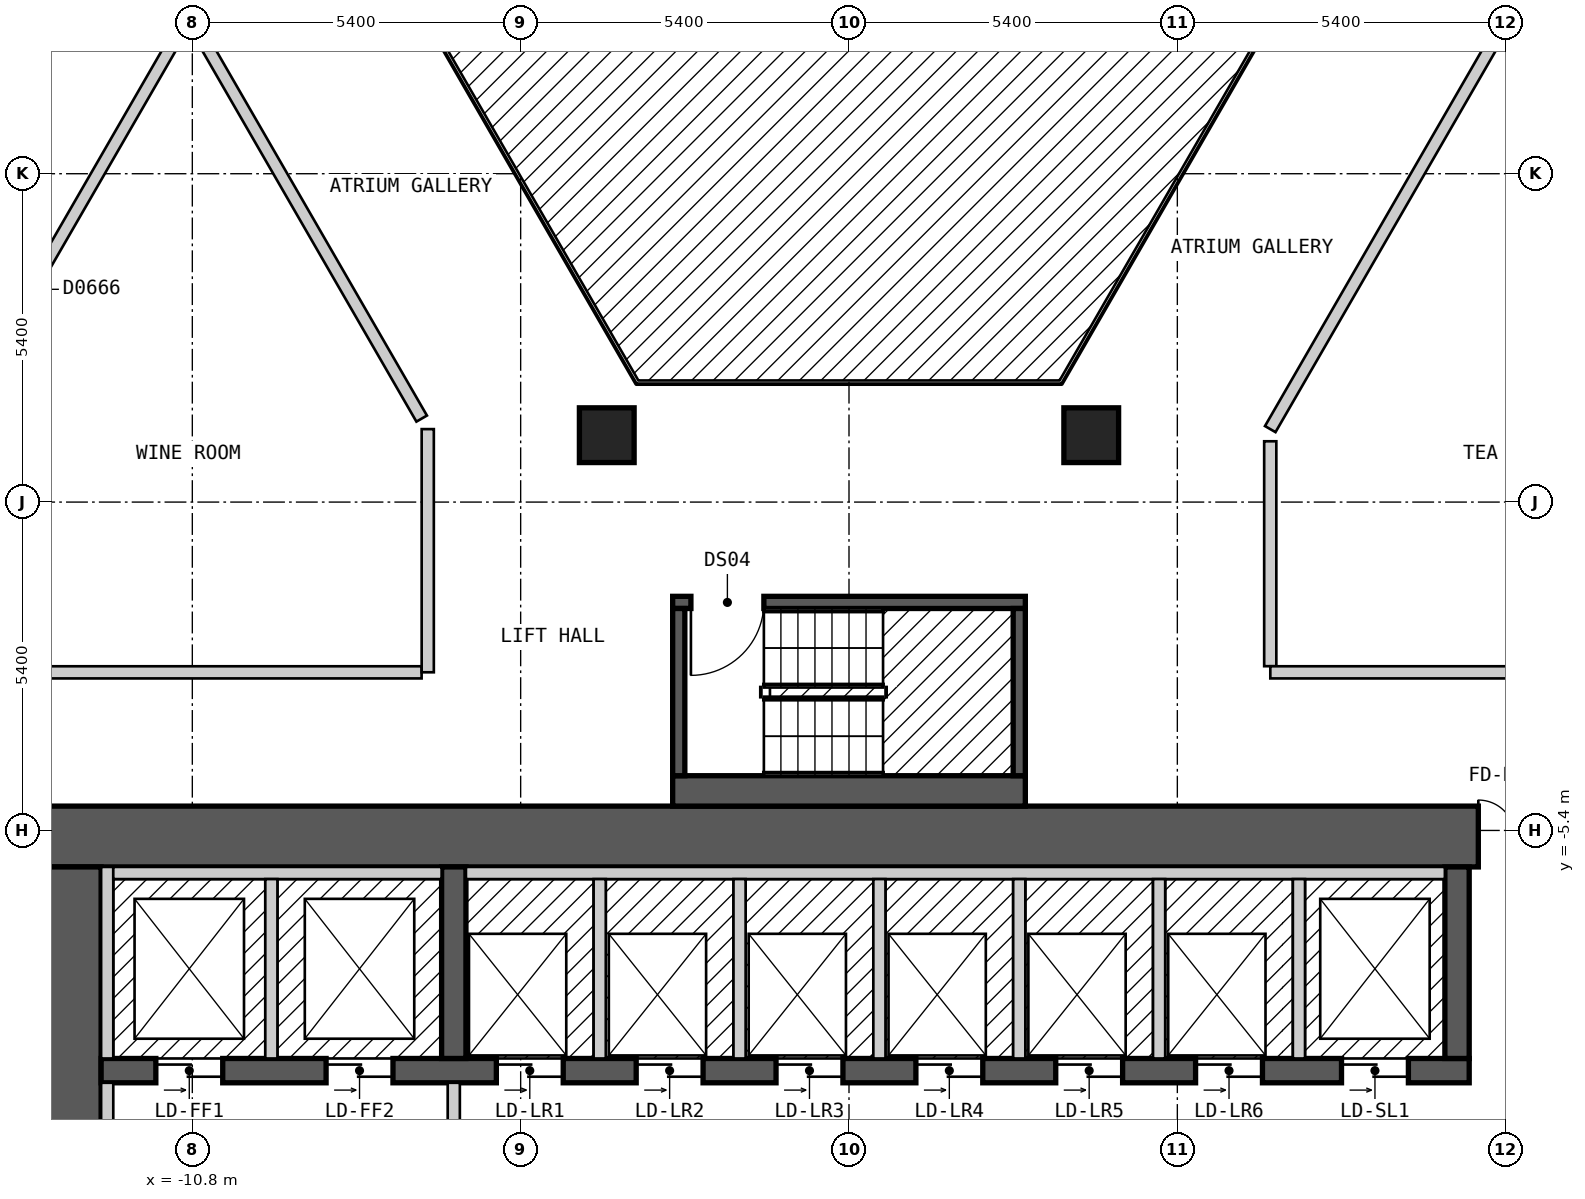
"""IFC4 building model, lengths in metres.
Left out: names, types, materials, properties, quantities, classifications, styles, units other than length and angle.
Written with IfcOpenShell. Run it as: python <this file> out.ifc"""

import sys

from ifc_helpers import new_model, si_unit, direction, frame, frame_2d, origin, origin_2d, place, context, subcontext, project, spatial, rectangle, extrude, element, fill, save


model = new_model("IFC4")
c1 = context("Model", 3, precision=1e-05, world=origin(), true_north=direction((0.0, 1.0)))
c2 = subcontext(c1, "Body", "Model", "MODEL_VIEW")
j1 = project(units=[si_unit("LENGTHUNIT", "METRE"), si_unit("PLANEANGLEUNIT", "RADIAN")], contexts=[c1])
p1 = place(None, origin())
s1 = spatial("IfcSite", under=j1, at=p1, CompositionType="ELEMENT")
p2 = place(p1, origin())
s2 = spatial("IfcBuilding", under=s1, at=p2, CompositionType="ELEMENT")
p3 = place(p2, frame((0.0, 0.0, 81.0)))
s3 = spatial("IfcBuildingStorey", under=s2, at=p3, CompositionType="ELEMENT", Elevation=81.0)
for number, where, z_axis, x_axis in (
    (1, (3.984, 1.1, 0.0), (0.0, 0.0, 1.0), (1.0, 0.0, 0.0)),
    (2, (-3.984, 1.1, 0.0), (0.0, 0.0, 1.0), (1.0, 0.0, 0.0)),
):
    element("IfcColumn", number, at=place(p3, frame(where, z_axis=z_axis, x_axis=x_axis)), inside=s3, PredefinedType="COLUMN", context=c2, shape_type="SweptSolid", body=[
        extrude(rectangle(XDim=0.9, YDim=0.9, at=origin_2d()), origin(), (0.0, 0.0, 1.0), 3.0),
    ])
p4 = place(p3, frame((-13.3, -5.5, 0.0), z_axis=(0.0, 0.0, 1.0), x_axis=(1.0, 0.0, 0.0)))
e3 = element("IfcWall", 3, at=p4, inside=s3, PredefinedType="SHEAR", context=c2, shape_type="SweptSolid", body=[
    extrude(rectangle(XDim=26.6, YDim=1.0, at=frame_2d((13.3, 0.0))), origin(), (0.0, 0.0, 1.0), 2.7),
])
p5 = place(p4, frame((23.65, 0.0, 0.0)))
e4 = element("IfcOpeningElement", 4, at=p5, cuts=e3, PredefinedType="OPENING", context=c2, shape_type="SweptSolid", body=[
    extrude(rectangle(XDim=1.2, YDim=2.1, at=frame_2d((0.6, 1.05))), frame((0.0, 0.51, 0.0), z_axis=(0.0, -1.0, 0.0), x_axis=(1.0, 0.0, 0.0)), (0.0, 0.0, 1.0), 1.02),
])
p6 = place(p3, frame((-12.8, -18.0, 0.0), z_axis=(0.0, 0.0, 1.0), x_axis=(0.0, 1.0, 0.0)))
e5 = element("IfcWall", 5, at=p6, inside=s3, PredefinedType="SHEAR", context=c2, shape_type="SweptSolid", body=[
    extrude(rectangle(XDim=12.0, YDim=1.0, at=frame_2d((6.0, 0.0))), origin(), (0.0, 0.0, 1.0), 2.7),
])
p7 = place(p6, frame((3.8, 0.0, 0.0)))
e6 = element("IfcOpeningElement", 6, at=p7, cuts=e5, PredefinedType="OPENING", context=c2, shape_type="SweptSolid", body=[
    extrude(rectangle(XDim=1.2, YDim=2.1, at=frame_2d((0.6, 1.05))), frame((0.0, 0.51, 0.0), z_axis=(0.0, -1.0, 0.0), x_axis=(1.0, 0.0, 0.0)), (0.0, 0.0, 1.0), 1.02),
])
p8 = place(p3, frame((-12.3, -9.35, 0.0), z_axis=(0.0, 0.0, 1.0), x_axis=(1.0, 0.0, 0.0)))
e7 = element("IfcWall", 7, at=p8, inside=s3, PredefinedType="SHEAR", context=c2, shape_type="SweptSolid", body=[
    extrude(rectangle(XDim=22.5, YDim=0.4, at=frame_2d((11.25, 0.0))), origin(), (0.0, 0.0, 1.0), 2.7),
])
p9 = place(p8, frame((0.9, 0.0, 0.0)))
e8 = element("IfcOpeningElement", 8, at=p9, cuts=e7, PredefinedType="OPENING", context=c2, shape_type="SweptSolid", body=[
    extrude(rectangle(XDim=1.1, YDim=2.1, at=frame_2d((0.55, 1.05))), frame((0.0, 0.21, 0.0), z_axis=(0.0, -1.0, 0.0), x_axis=(1.0, 0.0, 0.0)), (0.0, 0.0, 1.0), 0.42),
])
p10 = place(p8, frame((3.7, 0.0, 0.0)))
e9 = element("IfcOpeningElement", 9, at=p10, cuts=e7, PredefinedType="OPENING", context=c2, shape_type="SweptSolid", body=[
    extrude(rectangle(XDim=1.1, YDim=2.1, at=frame_2d((0.55, 1.05))), frame((0.0, 0.21, 0.0), z_axis=(0.0, -1.0, 0.0), x_axis=(1.0, 0.0, 0.0)), (0.0, 0.0, 1.0), 0.42),
])
p11 = place(p8, frame((6.5, 0.0, 0.0)))
e10 = element("IfcOpeningElement", 10, at=p11, cuts=e7, PredefinedType="OPENING", context=c2, shape_type="SweptSolid", body=[
    extrude(rectangle(XDim=1.1, YDim=2.1, at=frame_2d((0.55, 1.05))), frame((0.0, 0.21, 0.0), z_axis=(0.0, -1.0, 0.0), x_axis=(1.0, 0.0, 0.0)), (0.0, 0.0, 1.0), 0.42),
])
p12 = place(p8, frame((8.8, 0.0, 0.0)))
e11 = element("IfcOpeningElement", 11, at=p12, cuts=e7, PredefinedType="OPENING", context=c2, shape_type="SweptSolid", body=[
    extrude(rectangle(XDim=1.1, YDim=2.1, at=frame_2d((0.55, 1.05))), frame((0.0, 0.21, 0.0), z_axis=(0.0, -1.0, 0.0), x_axis=(1.0, 0.0, 0.0)), (0.0, 0.0, 1.0), 0.42),
])
p13 = place(p8, frame((11.1, 0.0, 0.0)))
e12 = element("IfcOpeningElement", 12, at=p13, cuts=e7, PredefinedType="OPENING", context=c2, shape_type="SweptSolid", body=[
    extrude(rectangle(XDim=1.1, YDim=2.1, at=frame_2d((0.55, 1.05))), frame((0.0, 0.21, 0.0), z_axis=(0.0, -1.0, 0.0), x_axis=(1.0, 0.0, 0.0)), (0.0, 0.0, 1.0), 0.42),
])
p14 = place(p8, frame((13.4, 0.0, 0.0)))
e13 = element("IfcOpeningElement", 13, at=p14, cuts=e7, PredefinedType="OPENING", context=c2, shape_type="SweptSolid", body=[
    extrude(rectangle(XDim=1.1, YDim=2.1, at=frame_2d((0.55, 1.05))), frame((0.0, 0.21, 0.0), z_axis=(0.0, -1.0, 0.0), x_axis=(1.0, 0.0, 0.0)), (0.0, 0.0, 1.0), 0.42),
])
p15 = place(p8, frame((15.7, 0.0, 0.0)))
e14 = element("IfcOpeningElement", 14, at=p15, cuts=e7, PredefinedType="OPENING", context=c2, shape_type="SweptSolid", body=[
    extrude(rectangle(XDim=1.1, YDim=2.1, at=frame_2d((0.55, 1.05))), frame((0.0, 0.21, 0.0), z_axis=(0.0, -1.0, 0.0), x_axis=(1.0, 0.0, 0.0)), (0.0, 0.0, 1.0), 0.42),
])
p16 = place(p8, frame((18.0, 0.0, 0.0)))
e15 = element("IfcOpeningElement", 15, at=p16, cuts=e7, PredefinedType="OPENING", context=c2, shape_type="SweptSolid", body=[
    extrude(rectangle(XDim=1.1, YDim=2.1, at=frame_2d((0.55, 1.05))), frame((0.0, 0.21, 0.0), z_axis=(0.0, -1.0, 0.0), x_axis=(1.0, 0.0, 0.0)), (0.0, 0.0, 1.0), 0.42),
])
p17 = place(p8, frame((20.4, 0.0, 0.0)))
e16 = element("IfcOpeningElement", 16, at=p17, cuts=e7, PredefinedType="OPENING", context=c2, shape_type="SweptSolid", body=[
    extrude(rectangle(XDim=1.1, YDim=2.1, at=frame_2d((0.55, 1.05))), frame((0.0, 0.21, 0.0), z_axis=(0.0, -1.0, 0.0), x_axis=(1.0, 0.0, 0.0)), (0.0, 0.0, 1.0), 0.42),
])
for number, where, z_axis, x_axis in (
    (17, (-6.5, -9.15, 0.0), (0.0, 0.0, 1.0), (0.0, 1.0, 0.0)),
    (18, (10.0, -9.15, 0.0), (0.0, 0.0, 1.0), (0.0, 1.0, 0.0)),
):
    element("IfcWall", number, at=place(p3, frame(where, z_axis=z_axis, x_axis=x_axis)), inside=s3, PredefinedType="SHEAR", context=c2, shape_type="SweptSolid", body=[
        extrude(rectangle(XDim=3.15, YDim=0.4, at=frame_2d((1.575, 0.0))), origin(), (0.0, 0.0, 1.0), 2.7),
    ])
p18 = place(p3, frame((-2.9, -4.75, 0.0), z_axis=(0.0, 0.0, 1.0), x_axis=(1.0, 0.0, 0.0)))
e19 = element("IfcWall", 19, at=p18, inside=s3, PredefinedType="SOLIDWALL", context=c2, shape_type="SweptSolid", body=[
    extrude(rectangle(XDim=5.8, YDim=0.5, at=frame_2d((2.9, 0.0))), origin(), (0.0, 0.0, 1.0), 2.7),
])
p19 = place(p3, frame((-2.9, -1.65, 0.0), z_axis=(0.0, 0.0, 1.0), x_axis=(1.0, 0.0, 0.0)))
e20 = element("IfcWall", 20, at=p19, inside=s3, PredefinedType="SOLIDWALL", context=c2, shape_type="SweptSolid", body=[
    extrude(rectangle(XDim=5.8, YDim=0.2, at=frame_2d((2.9, 0.0))), origin(), (0.0, 0.0, 1.0), 2.7),
])
p20 = place(p19, frame((0.3, 0.0, 0.0)))
e21 = element("IfcOpeningElement", 21, at=p20, cuts=e20, PredefinedType="OPENING", context=c2, shape_type="SweptSolid", body=[
    extrude(rectangle(XDim=1.2, YDim=2.1, at=frame_2d((0.6, 1.05))), frame((0.0, 0.11, 0.0), z_axis=(0.0, -1.0, 0.0), x_axis=(1.0, 0.0, 0.0)), (0.0, 0.0, 1.0), 0.22),
])
for number, where, z_axis, x_axis in (
    (22, (-2.8, -4.5, 0.0), (0.0, 0.0, 1.0), (0.0, 1.0, 0.0)),
    (23, (2.8, -4.5, 0.0), (0.0, 0.0, 1.0), (0.0, 1.0, 0.0)),
):
    element("IfcWall", number, at=place(p3, frame(where, z_axis=z_axis, x_axis=x_axis)), inside=s3, PredefinedType="SOLIDWALL", context=c2, shape_type="SweptSolid", body=[
        extrude(rectangle(XDim=2.75, YDim=0.2, at=frame_2d((1.375, 0.0))), origin(), (0.0, 0.0, 1.0), 2.7),
    ])
p21 = place(p3, frame((-10.796, 7.899, 0.0), z_axis=(0.0, 0.0, 1.0), x_axis=(0.500010383074, -0.866019409031, 0.0)))
e24 = element("IfcWall", 24, at=p21, inside=s3, PredefinedType="PARTITIONING", context=c2, shape_type="SweptSolid", body=[
    extrude(rectangle(XDim=7.535, YDim=0.2, at=frame_2d((3.768, 0.0))), origin(), (0.0, 0.0, 1.0), 2.7),
])
p22 = place(p3, frame((8.488, 16.5, 0.0), z_axis=(0.0, 0.0, 1.0), x_axis=(0.499986836607, -0.86603300354, 0.0)))
e25 = element("IfcWall", 25, at=p22, inside=s3, PredefinedType="PARTITIONING", context=c2, shape_type="SweptSolid", body=[
    extrude(rectangle(XDim=20.09, YDim=0.2, at=frame_2d((10.045, 0.0))), origin(), (0.0, 0.0, 1.0), 2.7),
])
p23 = place(p22, frame((14.569, 0.0, 0.0)))
e26 = element("IfcOpeningElement", 26, at=p23, cuts=e25, PredefinedType="OPENING", context=c2, shape_type="SweptSolid", body=[
    extrude(rectangle(XDim=1.0, YDim=2.1, at=frame_2d((0.5, 1.05))), frame((0.0, 0.11, 0.0), z_axis=(0.0, -1.0, 0.0), x_axis=(1.0, 0.0, 0.0)), (0.0, 0.0, 1.0), 0.22),
])
p24 = place(p3, frame((6.928, 1.0, 0.0), z_axis=(0.0, 0.0, 1.0), x_axis=(0.0, -1.0, 0.0)))
e27 = element("IfcWall", 27, at=p24, inside=s3, PredefinedType="PARTITIONING", context=c2, shape_type="SweptSolid", body=[
    extrude(rectangle(XDim=3.699, YDim=0.2, at=frame_2d((1.85, 0.0))), origin(), (0.0, 0.0, 1.0), 2.7),
])
p25 = place(p3, frame((-15.011, -2.8, 0.0), z_axis=(0.0, 0.0, 1.0), x_axis=(1.0, 0.0, 0.0)))
e28 = element("IfcWall", 28, at=p25, inside=s3, PredefinedType="PARTITIONING", context=c2, shape_type="SweptSolid", body=[
    extrude(rectangle(XDim=7.982, YDim=0.2, at=frame_2d((3.991, 0.0))), origin(), (0.0, 0.0, 1.0), 2.7),
])
p26 = place(p3, frame((6.929, -2.8, 0.0), z_axis=(0.0, 0.0, 1.0), x_axis=(1.0, 0.0, 0.0)))
e29 = element("IfcWall", 29, at=p26, inside=s3, PredefinedType="PARTITIONING", context=c2, shape_type="SweptSolid", body=[
    extrude(rectangle(XDim=7.966, YDim=0.2, at=frame_2d((3.983, 0.0))), origin(), (0.0, 0.0, 1.0), 2.7),
])
p27 = place(p3, frame((6.928, 1.2, 0.0), z_axis=(0.0, 0.0, 1.0), x_axis=(0.500055327065, 0.865993458332, 0.0)))
e30 = element("IfcWall", 30, at=p27, inside=s3, PredefinedType="PARTITIONING", context=c2, shape_type="SweptSolid", body=[
    extrude(rectangle(XDim=7.851, YDim=0.2, at=frame_2d((3.926, 0.0))), origin(), (0.0, 0.0, 1.0), 2.7),
])
p28 = place(p3, frame((-16.05, -1.0, 0.0), z_axis=(0.0, 0.0, 1.0), x_axis=(0.499962449088, 0.866047082728, 0.0)))
e31 = element("IfcWall", 31, at=p28, inside=s3, PredefinedType="PARTITIONING", context=c2, shape_type="SweptSolid", body=[
    extrude(rectangle(XDim=10.391, YDim=0.2, at=frame_2d((5.195, 0.0))), origin(), (0.0, 0.0, 1.0), 2.7),
])
p29 = place(p28, frame((4.745, 0.0, 0.0)))
e32 = element("IfcOpeningElement", 32, at=p29, cuts=e31, PredefinedType="OPENING", context=c2, shape_type="SweptSolid", body=[
    extrude(rectangle(XDim=0.9, YDim=2.1, at=frame_2d((0.45, 1.05))), frame((0.0, 0.11, 0.0), z_axis=(0.0, -1.0, 0.0), x_axis=(1.0, 0.0, 0.0)), (0.0, 0.0, 1.0), 0.22),
])
p30 = place(p3, frame((-18.562, -0.951, 0.0), z_axis=(0.0, 0.0, 1.0), x_axis=(0.499992962407, 0.866029466902, 0.0)))
e33 = element("IfcWall", 33, at=p30, inside=s3, PredefinedType="PARTITIONING", context=c2, shape_type="SweptSolid", body=[
    extrude(rectangle(XDim=20.208, YDim=0.2, at=frame_2d((10.104, 0.0))), origin(), (0.0, 0.0, 1.0), 2.7),
])
p31 = place(p30, frame((9.604, 0.0, 0.0)))
e34 = element("IfcOpeningElement", 34, at=p31, cuts=e33, PredefinedType="OPENING", context=c2, shape_type="SweptSolid", body=[
    extrude(rectangle(XDim=1.0, YDim=2.1, at=frame_2d((0.5, 1.05))), frame((0.0, 0.11, 0.0), z_axis=(0.0, -1.0, 0.0), x_axis=(1.0, 0.0, 0.0)), (0.0, 0.0, 1.0), 0.22),
])
p32 = place(p3, frame((-6.928, -2.799, 0.0), z_axis=(0.0, 0.0, 1.0), x_axis=(0.0, 1.0, 0.0)))
e35 = element("IfcWall", 35, at=p32, inside=s3, PredefinedType="PARTITIONING", context=c2, shape_type="SweptSolid", body=[
    extrude(rectangle(XDim=3.999, YDim=0.2, at=frame_2d((2.0, 0.0))), origin(), (0.0, 0.0, 1.0), 2.7),
])
p33 = place(p3, frame((-12.2, -13.0, 0.0), z_axis=(0.0, 0.0, 1.0), x_axis=(0.0, 1.0, 0.0)))
e36 = element("IfcWall", 36, at=p33, inside=s3, PredefinedType="PARTITIONING", context=c2, shape_type="SweptSolid", body=[
    extrude(rectangle(XDim=3.45, YDim=0.2, at=frame_2d((1.725, 0.0))), origin(), (0.0, 0.0, 1.0), 2.7),
])
p34 = place(p3, frame((-12.2, -9.15, 0.0), z_axis=(0.0, 0.0, 1.0), x_axis=(0.0, 1.0, 0.0)))
e37 = element("IfcWall", 37, at=p34, inside=s3, PredefinedType="SOLIDWALL", context=c2, shape_type="SweptSolid", body=[
    extrude(rectangle(XDim=3.15, YDim=0.2, at=frame_2d((1.575, 0.0))), origin(), (0.0, 0.0, 1.0), 2.7),
])
p35 = place(p3, frame((-12.1, -6.1, 0.0), z_axis=(0.0, 0.0, 1.0), x_axis=(1.0, 0.0, 0.0)))
e38 = element("IfcWall", 38, at=p35, inside=s3, PredefinedType="SOLIDWALL", context=c2, shape_type="SweptSolid", body=[
    extrude(rectangle(XDim=5.4, YDim=0.2, at=frame_2d((2.7, 0.0))), origin(), (0.0, 0.0, 1.0), 2.7),
])
p36 = place(p3, frame((-9.5, -9.15, 0.0), z_axis=(0.0, 0.0, 1.0), x_axis=(0.0, 1.0, 0.0)))
e39 = element("IfcWall", 39, at=p36, inside=s3, PredefinedType="SOLIDWALL", context=c2, shape_type="SweptSolid", body=[
    extrude(rectangle(XDim=2.95, YDim=0.2, at=frame_2d((1.475, 0.0))), origin(), (0.0, 0.0, 1.0), 2.7),
])
p37 = place(p3, frame((-6.5, -14.45, 0.0), z_axis=(0.0, 0.0, 1.0), x_axis=(0.0, 1.0, 0.0)))
e40 = element("IfcWall", 40, at=p37, inside=s3, PredefinedType="PARTITIONING", context=c2, shape_type="SweptSolid", body=[
    extrude(rectangle(XDim=4.9, YDim=0.2, at=frame_2d((2.45, 0.0))), origin(), (0.0, 0.0, 1.0), 2.7),
])
p38 = place(p37, frame((3.15, 0.0, 0.0), z_axis=(0.0, 0.0, 1.0), x_axis=(-1.0, 0.0, 0.0)))
e41 = element("IfcOpeningElement", 41, at=p38, cuts=e40, PredefinedType="OPENING", context=c2, shape_type="SweptSolid", body=[
    extrude(rectangle(XDim=1.4, YDim=2.1, at=frame_2d((0.7, 1.05))), frame((0.0, 0.11, 0.0), z_axis=(0.0, -1.0, 0.0), x_axis=(1.0, 0.0, 0.0)), (0.0, 0.0, 1.0), 0.22),
])
p39 = place(p3, frame((-6.3, -6.1, 0.0), z_axis=(0.0, 0.0, 1.0), x_axis=(1.0, 0.0, 0.0)))
e42 = element("IfcWall", 42, at=p39, inside=s3, PredefinedType="SOLIDWALL", context=c2, shape_type="SweptSolid", body=[
    extrude(rectangle(XDim=16.1, YDim=0.2, at=frame_2d((8.05, 0.0))), origin(), (0.0, 0.0, 1.0), 2.7),
])
for number, where, z_axis, x_axis in (
    (43, (-4.1, -9.15, 0.0), (0.0, 0.0, 1.0), (0.0, 1.0, 0.0)),
    (44, (-1.8, -9.15, 0.0), (0.0, 0.0, 1.0), (0.0, 1.0, 0.0)),
    (45, (0.5, -9.15, 0.0), (0.0, 0.0, 1.0), (0.0, 1.0, 0.0)),
    (46, (2.8, -9.15, 0.0), (0.0, 0.0, 1.0), (0.0, 1.0, 0.0)),
    (47, (5.1, -9.15, 0.0), (0.0, 0.0, 1.0), (0.0, 1.0, 0.0)),
    (48, (7.4, -9.15, 0.0), (0.0, 0.0, 1.0), (0.0, 1.0, 0.0)),
):
    element("IfcWall", number, at=place(p3, frame(where, z_axis=z_axis, x_axis=x_axis)), inside=s3, PredefinedType="SOLIDWALL", context=c2, shape_type="SweptSolid", body=[
        extrude(rectangle(XDim=2.95, YDim=0.2, at=frame_2d((1.475, 0.0))), origin(), (0.0, 0.0, 1.0), 2.7),
    ])
p40 = place(p20, origin())
e49 = element("IfcDoor", 49, at=p40, inside=s3, OperationType="SINGLE_SWING_LEFT", PredefinedType="DOOR", context=c2, shape_type="SweptSolid", body=[
    extrude(rectangle(XDim=1.2, YDim=2.1, at=frame_2d((0.6, 1.05))), frame((0.0, 0.025, 0.0), z_axis=(0.0, -1.0, 0.0), x_axis=(1.0, 0.0, 0.0)), (0.0, 0.0, 1.0), 0.05),
])
fill(e21, e49)
p41 = place(p9, origin())
e50 = element("IfcDoor", 50, at=p41, inside=s3, OperationType="DOUBLE_DOOR_SLIDING", PredefinedType="DOOR", context=c2, shape_type="SweptSolid", body=[
    extrude(rectangle(XDim=1.1, YDim=2.1, at=frame_2d((0.55, 1.05))), frame((0.0, 0.025, 0.0), z_axis=(0.0, -1.0, 0.0), x_axis=(1.0, 0.0, 0.0)), (0.0, 0.0, 1.0), 0.05),
])
fill(e8, e50)
p42 = place(p10, origin())
e51 = element("IfcDoor", 51, at=p42, inside=s3, OperationType="DOUBLE_DOOR_SLIDING", PredefinedType="DOOR", context=c2, shape_type="SweptSolid", body=[
    extrude(rectangle(XDim=1.1, YDim=2.1, at=frame_2d((0.55, 1.05))), frame((0.0, 0.025, 0.0), z_axis=(0.0, -1.0, 0.0), x_axis=(1.0, 0.0, 0.0)), (0.0, 0.0, 1.0), 0.05),
])
fill(e9, e51)
p43 = place(p11, origin())
e52 = element("IfcDoor", 52, at=p43, inside=s3, OperationType="DOUBLE_DOOR_SLIDING", PredefinedType="DOOR", context=c2, shape_type="SweptSolid", body=[
    extrude(rectangle(XDim=1.1, YDim=2.1, at=frame_2d((0.55, 1.05))), frame((0.0, 0.025, 0.0), z_axis=(0.0, -1.0, 0.0), x_axis=(1.0, 0.0, 0.0)), (0.0, 0.0, 1.0), 0.05),
])
fill(e10, e52)
p44 = place(p12, origin())
e53 = element("IfcDoor", 53, at=p44, inside=s3, OperationType="DOUBLE_DOOR_SLIDING", PredefinedType="DOOR", context=c2, shape_type="SweptSolid", body=[
    extrude(rectangle(XDim=1.1, YDim=2.1, at=frame_2d((0.55, 1.05))), frame((0.0, 0.025, 0.0), z_axis=(0.0, -1.0, 0.0), x_axis=(1.0, 0.0, 0.0)), (0.0, 0.0, 1.0), 0.05),
])
fill(e11, e53)
p45 = place(p13, origin())
e54 = element("IfcDoor", 54, at=p45, inside=s3, OperationType="DOUBLE_DOOR_SLIDING", PredefinedType="DOOR", context=c2, shape_type="SweptSolid", body=[
    extrude(rectangle(XDim=1.1, YDim=2.1, at=frame_2d((0.55, 1.05))), frame((0.0, 0.025, 0.0), z_axis=(0.0, -1.0, 0.0), x_axis=(1.0, 0.0, 0.0)), (0.0, 0.0, 1.0), 0.05),
])
fill(e12, e54)
p46 = place(p14, origin())
e55 = element("IfcDoor", 55, at=p46, inside=s3, OperationType="DOUBLE_DOOR_SLIDING", PredefinedType="DOOR", context=c2, shape_type="SweptSolid", body=[
    extrude(rectangle(XDim=1.1, YDim=2.1, at=frame_2d((0.55, 1.05))), frame((0.0, 0.025, 0.0), z_axis=(0.0, -1.0, 0.0), x_axis=(1.0, 0.0, 0.0)), (0.0, 0.0, 1.0), 0.05),
])
fill(e13, e55)
p47 = place(p15, origin())
e56 = element("IfcDoor", 56, at=p47, inside=s3, OperationType="DOUBLE_DOOR_SLIDING", PredefinedType="DOOR", context=c2, shape_type="SweptSolid", body=[
    extrude(rectangle(XDim=1.1, YDim=2.1, at=frame_2d((0.55, 1.05))), frame((0.0, 0.025, 0.0), z_axis=(0.0, -1.0, 0.0), x_axis=(1.0, 0.0, 0.0)), (0.0, 0.0, 1.0), 0.05),
])
fill(e14, e56)
p48 = place(p16, origin())
e57 = element("IfcDoor", 57, at=p48, inside=s3, OperationType="DOUBLE_DOOR_SLIDING", PredefinedType="DOOR", context=c2, shape_type="SweptSolid", body=[
    extrude(rectangle(XDim=1.1, YDim=2.1, at=frame_2d((0.55, 1.05))), frame((0.0, 0.025, 0.0), z_axis=(0.0, -1.0, 0.0), x_axis=(1.0, 0.0, 0.0)), (0.0, 0.0, 1.0), 0.05),
])
fill(e15, e57)
p49 = place(p17, origin())
e58 = element("IfcDoor", 58, at=p49, inside=s3, OperationType="DOUBLE_DOOR_SLIDING", PredefinedType="DOOR", context=c2, shape_type="SweptSolid", body=[
    extrude(rectangle(XDim=1.1, YDim=2.1, at=frame_2d((0.55, 1.05))), frame((0.0, 0.025, 0.0), z_axis=(0.0, -1.0, 0.0), x_axis=(1.0, 0.0, 0.0)), (0.0, 0.0, 1.0), 0.05),
])
fill(e16, e58)
p50 = place(p5, origin())
e59 = element("IfcDoor", 59, at=p50, inside=s3, OperationType="DOUBLE_DOOR_SINGLE_SWING", PredefinedType="DOOR", context=c2, shape_type="SweptSolid", body=[
    extrude(rectangle(XDim=1.2, YDim=2.1, at=frame_2d((0.6, 1.05))), frame((0.0, 0.025, 0.0), z_axis=(0.0, -1.0, 0.0), x_axis=(1.0, 0.0, 0.0)), (0.0, 0.0, 1.0), 0.05),
])
fill(e4, e59)
save(model, sys.argv[1])
